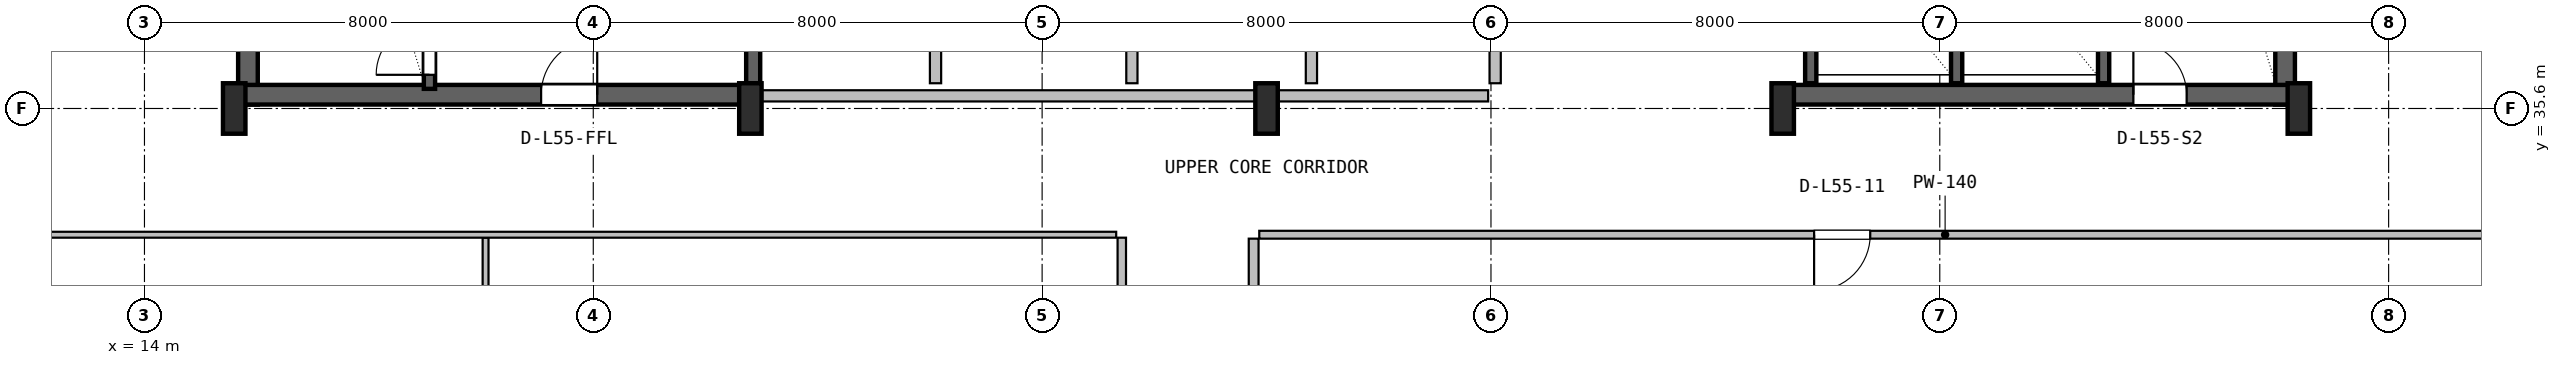
"""IFC4 building model, lengths in metres.
Left out: names, types, materials, properties, quantities, classifications, styles, units other than length and angle.
Written with IfcOpenShell. Run it as: python <this file> out.ifc"""

import sys

from ifc_helpers import new_model, si_unit, direction, frame, frame_2d, origin, origin_2d, place, context, subcontext, project, spatial, rectangle, i_section, extrude, source, transform, mapped, element, fill, save


model = new_model("IFC4")
c1 = context("Model", 3, precision=1e-05, world=origin(), true_north=direction((0.0, 1.0)))
c2 = subcontext(c1, "Body", "Model", "MODEL_VIEW")
j1 = project(units=[si_unit("LENGTHUNIT", "METRE"), si_unit("PLANEANGLEUNIT", "RADIAN")], contexts=[c1])
p1 = place(None, origin())
s1 = spatial("IfcSite", under=j1, at=p1, CompositionType="ELEMENT")
p2 = place(p1, origin())
s2 = spatial("IfcBuilding", under=s1, at=p2, CompositionType="ELEMENT")
p3 = place(p2, frame((0.0, 0.0, 222.6)))
s3 = spatial("IfcBuildingStorey", under=s2, at=p3, CompositionType="ELEMENT", Elevation=222.6)
for number, where, z_axis, x_axis in (
    (1, (15.845, 35.67, 0.0), (0.0, 0.0, 1.0), (0.0, 1.0, 0.0)),
    (2, (52.155, 35.67, 0.0), (0.0, 0.0, 1.0), (0.0, 1.0, 0.0)),
):
    element("IfcWall", number, at=place(p3, frame(where, z_axis=z_axis, x_axis=x_axis)), inside=s3, PredefinedType="SHEAR", context=c2, shape_type="SweptSolid", body=[
        extrude(rectangle(XDim=11.13, YDim=0.35, at=frame_2d((5.565, 0.0))), origin(), (0.0, 0.0, 1.0), 3.55),
    ])
p4 = place(p3, frame((15.67, 35.845, 0.0), z_axis=(0.0, 0.0, 1.0), x_axis=(1.0, 0.0, 0.0)))
e3 = element("IfcWall", 3, at=p4, inside=s3, PredefinedType="SHEAR", context=c2, shape_type="SweptSolid", body=[
    extrude(rectangle(XDim=9.13, YDim=0.35, at=frame_2d((4.565, 0.0))), origin(), (0.0, 0.0, 1.0), 3.55),
])
p5 = place(p4, frame((5.4, 0.0, 0.0)))
e4 = element("IfcOpeningElement", 4, at=p5, cuts=e3, PredefinedType="OPENING", context=c2, shape_type="SweptSolid", body=[
    extrude(rectangle(XDim=1.0, YDim=2.1, at=frame_2d((0.5, 1.05))), frame((0.0, 0.185, 0.0), z_axis=(0.0, -1.0, 0.0), x_axis=(1.0, 0.0, 0.0)), (0.0, 0.0, 1.0), 0.37),
])
p6 = place(p3, frame((43.2, 35.845, 0.0), z_axis=(0.0, 0.0, 1.0), x_axis=(1.0, 0.0, 0.0)))
e5 = element("IfcWall", 5, at=p6, inside=s3, PredefinedType="SHEAR", context=c2, shape_type="SweptSolid", body=[
    extrude(rectangle(XDim=9.13, YDim=0.35, at=frame_2d((4.565, 0.0))), origin(), (0.0, 0.0, 1.0), 3.55),
])
p7 = place(p6, frame((6.25, 0.0, 0.0)))
e6 = element("IfcOpeningElement", 6, at=p7, cuts=e5, PredefinedType="OPENING", context=c2, shape_type="SweptSolid", body=[
    extrude(rectangle(XDim=0.95, YDim=2.1, at=frame_2d((0.475, 1.05))), frame((0.0, 0.185, 0.0), z_axis=(0.0, -1.0, 0.0), x_axis=(1.0, 0.0, 0.0)), (0.0, 0.0, 1.0), 0.37),
])
m1 = source(origin(), c2, "Body", "SweptSolid", [
    extrude(i_section(OverallWidth=0.4, OverallDepth=0.9, WebThickness=0.016, FlangeThickness=0.028, FilletRadius=0.016, at=origin_2d()), origin(), (0.0, 0.0, 1.0), 3.8),
])
for number, where, z_axis, x_axis in (
    (7, (15.6, 35.6, 0.0), (0.0, 0.0, 1.0), (1.0, 0.0, 0.0)),
    (8, (24.8, 35.6, 0.0), (0.0, 0.0, 1.0), (1.0, 0.0, 0.0)),
    (9, (34.0, 35.6, 0.0), (0.0, 0.0, 1.0), (1.0, 0.0, 0.0)),
    (10, (43.2, 35.6, 0.0), (0.0, 0.0, 1.0), (1.0, 0.0, 0.0)),
    (11, (52.4, 35.6, 0.0), (0.0, 0.0, 1.0), (1.0, 0.0, 0.0)),
):
    element("IfcColumn", number, at=place(p3, frame(where, z_axis=z_axis, x_axis=x_axis)), inside=s3, PredefinedType="COLUMN", context=c2, shape_type="MappedRepresentation", body=[
        mapped(m1, transform((0.0, 0.0, 0.0), x_axis=(1.0, 0.0, 0.0), y_axis=(0.0, 1.0, 0.0), z_axis=(0.0, 0.0, 1.0), scale=1.0)),
    ])
p8 = place(p3, frame((19.08, 35.95, 0.0), z_axis=(0.0, 0.0, 1.0), x_axis=(0.0, 1.0, 0.0)))
e12 = element("IfcWall", 12, at=p8, inside=s3, PredefinedType="SHEAR", context=c2, shape_type="SweptSolid", body=[
    extrude(rectangle(XDim=9.65, YDim=0.2, at=frame_2d((4.825, 0.0))), origin(), (0.0, 0.0, 1.0), 3.55),
])
p9 = place(p8, frame((0.25, 0.0, 0.0)))
e13 = element("IfcOpeningElement", 13, at=p9, cuts=e12, PredefinedType="OPENING", context=c2, shape_type="SweptSolid", body=[
    extrude(rectangle(XDim=0.95, YDim=2.1, at=frame_2d((0.475, 1.05))), frame((0.0, 0.11, 0.0), z_axis=(0.0, -1.0, 0.0), x_axis=(1.0, 0.0, 0.0)), (0.0, 0.0, 1.0), 0.22),
])
p10 = place(p3, frame((24.85, 36.05, 0.0), z_axis=(0.0, 0.0, 1.0), x_axis=(0.0, 1.0, 0.0)))
e14 = element("IfcWall", 14, at=p10, inside=s3, PredefinedType="SHEAR", context=c2, shape_type="SweptSolid", body=[
    extrude(rectangle(XDim=10.45, YDim=0.25, at=frame_2d((5.225, 0.0))), origin(), (0.0, 0.0, 1.0), 3.55),
])
p11 = place(p3, frame((48.92, 36.05, 0.0), z_axis=(0.0, 0.0, 1.0), x_axis=(0.0, 1.0, 0.0)))
e15 = element("IfcWall", 15, at=p11, inside=s3, PredefinedType="SHEAR", context=c2, shape_type="SweptSolid", body=[
    extrude(rectangle(XDim=10.5, YDim=0.2, at=frame_2d((5.25, 0.0))), origin(), (0.0, 0.0, 1.0), 3.55),
])
for number, where, z_axis, x_axis in (
    (16, (43.7, 36.05, 0.0), (0.0, 0.0, 1.0), (0.0, 1.0, 0.0)),
    (17, (46.3, 36.05, 0.0), (0.0, 0.0, 1.0), (0.0, 1.0, 0.0)),
):
    element("IfcWall", number, at=place(p3, frame(where, z_axis=z_axis, x_axis=x_axis)), inside=s3, PredefinedType="SHEAR", context=c2, shape_type="SweptSolid", body=[
        extrude(rectangle(XDim=3.05, YDim=0.2, at=frame_2d((1.525, 0.0))), origin(), (0.0, 0.0, 1.0), 3.55),
    ])
p12 = place(p3, frame((25.0, 35.825, 0.0), z_axis=(0.0, 0.0, 1.0), x_axis=(1.0, 0.0, 0.0)))
e18 = element("IfcWall", 18, at=p12, inside=s3, PredefinedType="SOLIDWALL", context=c2, shape_type="SweptSolid", body=[
    extrude(rectangle(XDim=12.95, YDim=0.2, at=frame_2d((6.475, 0.0))), origin(), (0.0, 0.0, 1.0), 2.575),
])
for number, where, z_axis, x_axis in (
    (19, (28.1, 36.05, 0.0), (0.0, 0.0, 1.0), (0.0, 1.0, 0.0)),
    (20, (31.6, 36.05, 0.0), (0.0, 0.0, 1.0), (0.0, 1.0, 0.0)),
):
    element("IfcWall", number, at=place(p3, frame(where, z_axis=z_axis, x_axis=x_axis)), inside=s3, PredefinedType="PLUMBINGWALL", context=c2, shape_type="SweptSolid", body=[
        extrude(rectangle(XDim=3.1, YDim=0.2, at=frame_2d((1.55, 0.0))), origin(), (0.0, 0.0, 1.0), 3.53),
    ])
for number, where, z_axis, x_axis in (
    (21, (34.8, 36.05, 0.0), (0.0, 0.0, 1.0), (0.0, 1.0, 0.0)),
    (22, (38.075, 36.05, 0.0), (0.0, 0.0, 1.0), (0.0, 1.0, 0.0)),
):
    element("IfcWall", number, at=place(p3, frame(where, z_axis=z_axis, x_axis=x_axis)), inside=s3, PredefinedType="SOLIDWALL", context=c2, shape_type="SweptSolid", body=[
        extrude(rectangle(XDim=3.1, YDim=0.2, at=frame_2d((1.55, 0.0))), origin(), (0.0, 0.0, 1.0), 3.53),
    ])
p13 = place(p3, frame((20.08, 18.302, 0.0), z_axis=(0.0, 0.0, 1.0), x_axis=(0.0, 1.0, 0.0)))
e23 = element("IfcWall", 23, at=p13, inside=s3, PredefinedType="PARTITIONING", context=c2, shape_type="SweptSolid", body=[
    extrude(rectangle(XDim=14.995, YDim=0.105, at=frame_2d((7.498, 0.0))), origin(), (0.0, 0.0, 1.0), 3.222),
])
p14 = place(p3, frame((9.68, 33.35, 0.0), z_axis=(0.0, 0.0, 1.0), x_axis=(1.0, 0.0, 0.0)))
e24 = element("IfcWall", 24, at=p14, inside=s3, PredefinedType="PARTITIONING", context=c2, shape_type="SweptSolid", body=[
    extrude(rectangle(XDim=21.64, YDim=0.105, at=frame_2d((10.82, 0.0))), origin(), (0.0, 0.0, 1.0), 2.908),
])
p15 = place(p3, frame((31.42, 18.302, 0.0), z_axis=(0.0, 0.0, 1.0), x_axis=(0.0, 1.0, 0.0)))
e25 = element("IfcWall", 25, at=p15, inside=s3, PredefinedType="PARTITIONING", context=c2, shape_type="SweptSolid", body=[
    extrude(rectangle(XDim=14.995, YDim=0.15, at=frame_2d((7.498, 0.0))), origin(), (0.0, 0.0, 1.0), 2.908),
])
p16 = place(p15, frame((7.038, 0.0, 0.0)))
e26 = element("IfcOpeningElement", 26, at=p16, cuts=e25, PredefinedType="OPENING", context=c2, shape_type="SweptSolid", body=[
    extrude(rectangle(XDim=0.92, YDim=2.08, at=frame_2d((0.46, 1.04))), frame((0.0, 0.085, 0.0), z_axis=(0.0, -1.0, 0.0), x_axis=(1.0, 0.0, 0.0)), (0.0, 0.0, 1.0), 0.17),
])
p17 = place(p3, frame((33.77, 10.38, 0.0), z_axis=(0.0, 0.0, 1.0), x_axis=(0.0, 1.0, 0.0)))
e27 = element("IfcWall", 27, at=p17, inside=s3, PredefinedType="PARTITIONING", context=c2, shape_type="SweptSolid", body=[
    extrude(rectangle(XDim=22.9, YDim=0.175, at=frame_2d((11.45, 0.0))), origin(), (0.0, 0.0, 1.0), 2.908),
])
p18 = place(p17, frame((7.07, 0.0, 0.0)))
e28 = element("IfcOpeningElement", 28, at=p18, cuts=e27, PredefinedType="OPENING", context=c2, shape_type="SweptSolid", body=[
    extrude(rectangle(XDim=1.05, YDim=2.1, at=frame_2d((0.525, 1.05))), frame((0.0, 0.098, 0.0), z_axis=(0.0, -1.0, 0.0), x_axis=(1.0, 0.0, 0.0)), (0.0, 0.0, 1.0), 0.195),
])
p19 = place(p3, frame((33.87, 33.35, 0.0), z_axis=(0.0, 0.0, 1.0), x_axis=(1.0, 0.0, 0.0)))
e29 = element("IfcWall", 29, at=p19, inside=s3, PredefinedType="PARTITIONING", context=c2, shape_type="SweptSolid", body=[
    extrude(rectangle(XDim=24.45, YDim=0.14, at=frame_2d((12.225, 0.0))), origin(), (0.0, 0.0, 1.0), 2.908),
])
p20 = place(p19, frame((9.89, 0.0, 0.0)))
e30 = element("IfcOpeningElement", 30, at=p20, cuts=e29, PredefinedType="OPENING", context=c2, shape_type="SweptSolid", body=[
    extrude(rectangle(XDim=1.0, YDim=2.1, at=frame_2d((0.5, 1.05))), frame((0.0, 0.08, 0.0), z_axis=(0.0, -1.0, 0.0), x_axis=(1.0, 0.0, 0.0)), (0.0, 0.0, 1.0), 0.16),
])
m2 = source(origin(), c2, "Body", "SweptSolid", [
    extrude(rectangle(XDim=0.95, YDim=2.1, at=frame_2d((0.475, 1.05))), frame((0.0, 0.025, 0.0), z_axis=(0.0, -1.0, 0.0), x_axis=(1.0, 0.0, 0.0)), (0.0, 0.0, 1.0), 0.05),
])
p21 = place(p9, origin())
e31 = element("IfcDoor", 31, at=p21, inside=s3, OperationType="SINGLE_SWING_LEFT", PredefinedType="DOOR", context=c2, shape_type="MappedRepresentation", body=[
    mapped(m2, transform((0.0, 0.0, 0.0), x_axis=(1.0, 0.0, 0.0), y_axis=(0.0, 1.0, 0.0), z_axis=(0.0, 0.0, 1.0), scale=1.0)),
])
fill(e13, e31)
m3 = source(origin(), c2, "Body", "SweptSolid", [
    extrude(rectangle(XDim=1.0, YDim=2.1, at=frame_2d((0.5, 1.05))), frame((0.0, 0.025, 0.0), z_axis=(0.0, -1.0, 0.0), x_axis=(1.0, 0.0, 0.0)), (0.0, 0.0, 1.0), 0.05),
])
p22 = place(p5, origin())
e32 = element("IfcDoor", 32, at=p22, inside=s3, OperationType="SINGLE_SWING_RIGHT", PredefinedType="DOOR", context=c2, shape_type="MappedRepresentation", body=[
    mapped(m3, transform((0.0, 0.0, 0.0), x_axis=(1.0, 0.0, 0.0), y_axis=(0.0, 1.0, 0.0), z_axis=(0.0, 0.0, 1.0), scale=1.0)),
])
fill(e4, e32)
p23 = place(p7, origin())
e33 = element("IfcDoor", 33, at=p23, inside=s3, OperationType="SINGLE_SWING_LEFT", PredefinedType="DOOR", context=c2, shape_type="MappedRepresentation", body=[
    mapped(m2, transform((0.0, 0.0, 0.0), x_axis=(1.0, 0.0, 0.0), y_axis=(0.0, 1.0, 0.0), z_axis=(0.0, 0.0, 1.0), scale=1.0)),
])
fill(e6, e33)
m4 = source(origin(), c2, "Body", "SweptSolid", [
    extrude(rectangle(XDim=1.0, YDim=2.1, at=frame_2d((0.5, 1.05))), frame((0.0, 0.025, 0.0), z_axis=(0.0, -1.0, 0.0), x_axis=(1.0, 0.0, 0.0)), (0.0, 0.0, 1.0), 0.05),
])
p24 = place(p20, frame((1.0, 0.0, 0.0), z_axis=(0.0, 0.0, 1.0), x_axis=(-1.0, 0.0, 0.0)))
e34 = element("IfcDoor", 34, at=p24, inside=s3, OperationType="SINGLE_SWING_LEFT", PredefinedType="DOOR", context=c2, shape_type="MappedRepresentation", body=[
    mapped(m4, transform((0.0, 0.0, 0.0), x_axis=(1.0, 0.0, 0.0), y_axis=(0.0, 1.0, 0.0), z_axis=(0.0, 0.0, 1.0), scale=1.0)),
])
fill(e30, e34)
save(model, sys.argv[1])
